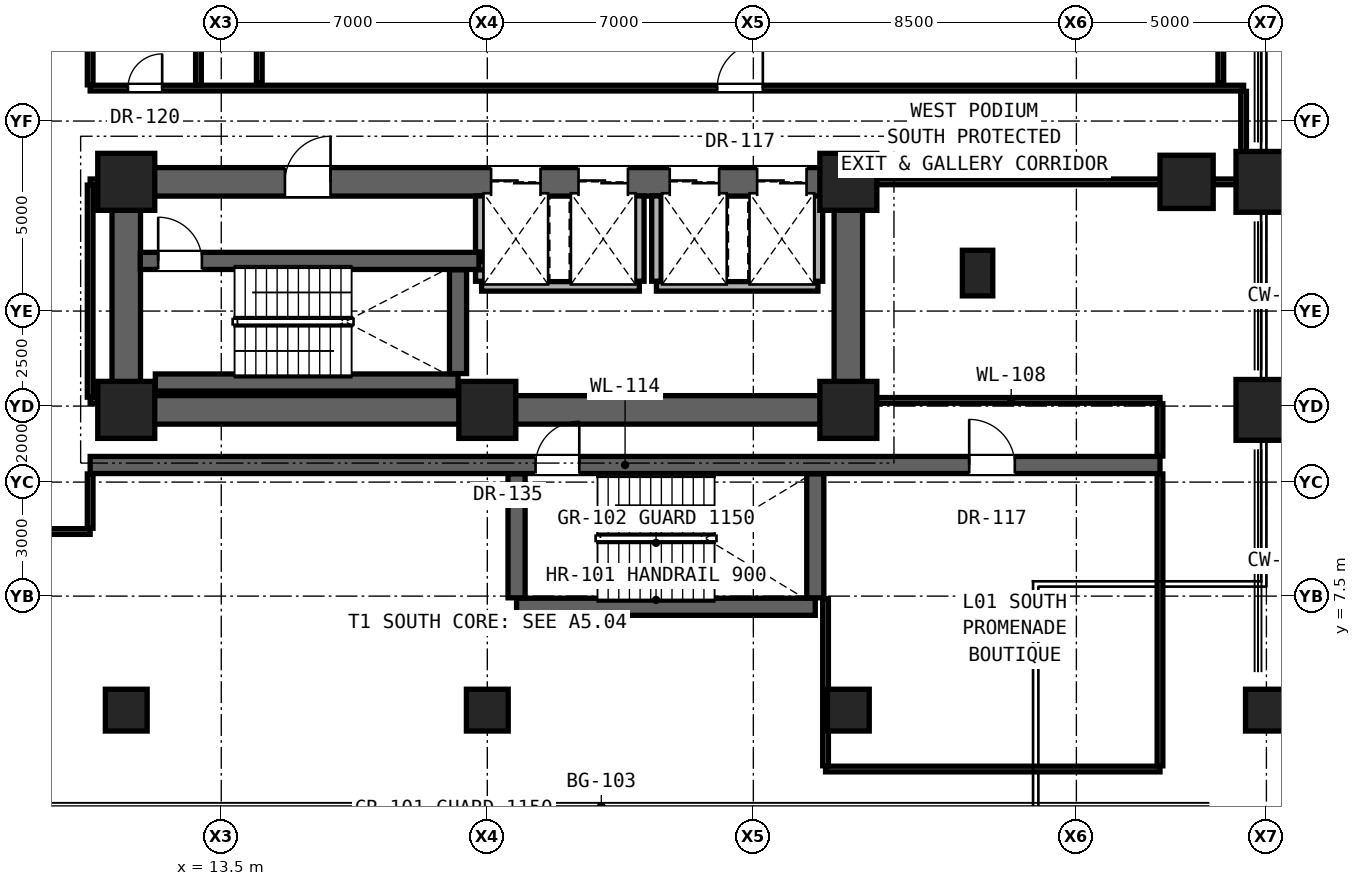
"""IFC4 building model, lengths in metres.
Left out: names, types, materials, properties, quantities, classifications, styles, units other than length and angle.
Written with IfcOpenShell. Run it as: python <this file> out.ifc"""

import sys

from ifc_helpers import new_model, si_unit, direction, frame, frame_2d, origin, origin_2d, place, context, subcontext, project, spatial, rectangle, hollow_rectangle, extrude, element, fill, save


model = new_model("IFC4")
c1 = context("Model", 3, precision=1e-05, world=origin(), true_north=direction((0.0, 1.0)))
c2 = subcontext(c1, "Body", "Model", "MODEL_VIEW")
j1 = project(units=[si_unit("LENGTHUNIT", "METRE"), si_unit("PLANEANGLEUNIT", "RADIAN")], contexts=[c1])
p1 = place(None, origin())
s1 = spatial("IfcSite", under=j1, at=p1, CompositionType="ELEMENT")
p2 = place(p1, origin())
s2 = spatial("IfcBuilding", under=s1, at=p2, CompositionType="ELEMENT")
p3 = place(p2, frame((0.0, 0.0, 5.2)))
s3 = spatial("IfcBuildingStorey", under=s2, at=p3, CompositionType="ELEMENT", Elevation=5.2)
for number, where, z_axis, x_axis in (
    (1, (11.0, 12.4, 0.0), (0.0, 0.0, 1.0), (1.0, 0.0, 0.0)),
    (2, (20.5, 12.4, 0.0), (0.0, 0.0, 1.0), (1.0, 0.0, 0.0)),
    (3, (30.0, 12.4, 0.0), (0.0, 0.0, 1.0), (1.0, 0.0, 0.0)),
    (4, (11.0, 18.4, 0.0), (0.0, 0.0, 1.0), (1.0, 0.0, 0.0)),
    (5, (30.0, 18.4, 0.0), (0.0, 0.0, 1.0), (1.0, 0.0, 0.0)),
):
    element("IfcColumn", number, at=place(p3, frame(where, z_axis=z_axis, x_axis=x_axis)), inside=s3, PredefinedType="COLUMN", context=c2, shape_type="SweptSolid", body=[
        extrude(rectangle(XDim=1.5, YDim=1.5, at=origin_2d()), origin(), (0.0, 0.0, 1.0), 4.3),
    ])
p4 = place(p3, frame((38.9, 18.4, 0.0), z_axis=(0.0, 0.0, 1.0), x_axis=(1.0, 0.0, 0.0)))
e6 = element("IfcColumn", 6, at=p4, inside=s3, PredefinedType="COLUMN", context=c2, shape_type="SweptSolid", body=[
    extrude(hollow_rectangle(XDim=1.4, YDim=1.4, WallThickness=0.08, at=origin_2d()), origin(), (0.0, 0.0, 1.0), 4.3),
])
p5 = place(p3, frame((33.4, 16.0, 0.0), z_axis=(0.0, 0.0, 1.0), x_axis=(1.0, 0.0, 0.0)))
e7 = element("IfcColumn", 7, at=p5, inside=s3, PredefinedType="PILASTER", context=c2, shape_type="SweptSolid", body=[
    extrude(rectangle(XDim=0.8, YDim=1.2, at=origin_2d()), origin(), (0.0, 0.0, 1.0), 4.3),
])
p6 = place(p3, frame((11.0, 12.4, 0.0), z_axis=(0.0, 0.0, 1.0), x_axis=(1.0, 0.0, 0.0)))
e8 = element("IfcWall", 8, at=p6, inside=s3, PredefinedType="SHEAR", context=c2, shape_type="SweptSolid", body=[
    extrude(rectangle(XDim=19.0, YDim=0.75, at=frame_2d((9.5, 0.0))), origin(), (0.0, 0.0, 1.0), 3.98),
])
for number, where, z_axis, x_axis in (
    (9, (11.0, 12.4, 0.0), (0.0, 0.0, 1.0), (0.0, 1.0, 0.0)),
    (10, (30.0, 12.4, 0.0), (0.0, 0.0, 1.0), (0.0, 1.0, 0.0)),
):
    element("IfcWall", number, at=place(p3, frame(where, z_axis=z_axis, x_axis=x_axis)), inside=s3, PredefinedType="SHEAR", context=c2, shape_type="SweptSolid", body=[
        extrude(rectangle(XDim=6.0, YDim=0.75, at=frame_2d((3.0, 0.0))), origin(), (0.0, 0.0, 1.0), 3.98),
    ])
p7 = place(p3, frame((11.0, 18.4, 0.0), z_axis=(0.0, 0.0, 1.0), x_axis=(1.0, 0.0, 0.0)))
e11 = element("IfcWall", 11, at=p7, inside=s3, PredefinedType="SHEAR", context=c2, shape_type="SweptSolid", body=[
    extrude(rectangle(XDim=19.0, YDim=0.75, at=frame_2d((9.5, 0.0))), origin(), (0.0, 0.0, 1.0), 3.98),
])
p8 = place(p7, frame((4.175, 0.0, 0.0)))
e12 = element("IfcOpeningElement", 12, at=p8, cuts=e11, PredefinedType="OPENING", context=c2, shape_type="SweptSolid", body=[
    extrude(rectangle(XDim=1.2, YDim=2.25, at=frame_2d((0.6, 1.125))), frame((0.0, 0.385, 0.0), z_axis=(0.0, -1.0, 0.0), x_axis=(1.0, 0.0, 0.0)), (0.0, 0.0, 1.0), 0.77),
])
p9 = place(p7, frame((9.6, 0.0, 0.0)))
e13 = element("IfcOpeningElement", 13, at=p9, cuts=e11, PredefinedType="OPENING", context=c2, shape_type="SweptSolid", body=[
    extrude(rectangle(XDim=1.3, YDim=2.3, at=frame_2d((0.65, 1.15))), frame((0.0, 0.385, 0.0), z_axis=(0.0, -1.0, 0.0), x_axis=(1.0, 0.0, 0.0)), (0.0, 0.0, 1.0), 0.77),
])
p10 = place(p7, frame((11.9, 0.0, 0.0)))
e14 = element("IfcOpeningElement", 14, at=p10, cuts=e11, PredefinedType="OPENING", context=c2, shape_type="SweptSolid", body=[
    extrude(rectangle(XDim=1.3, YDim=2.3, at=frame_2d((0.65, 1.15))), frame((0.0, 0.385, 0.0), z_axis=(0.0, -1.0, 0.0), x_axis=(1.0, 0.0, 0.0)), (0.0, 0.0, 1.0), 0.77),
])
p11 = place(p7, frame((14.3, 0.0, 0.0)))
e15 = element("IfcOpeningElement", 15, at=p11, cuts=e11, PredefinedType="OPENING", context=c2, shape_type="SweptSolid", body=[
    extrude(rectangle(XDim=1.3, YDim=2.3, at=frame_2d((0.65, 1.15))), frame((0.0, 0.385, 0.0), z_axis=(0.0, -1.0, 0.0), x_axis=(1.0, 0.0, 0.0)), (0.0, 0.0, 1.0), 0.77),
])
p12 = place(p7, frame((16.6, 0.0, 0.0)))
e16 = element("IfcOpeningElement", 16, at=p12, cuts=e11, PredefinedType="OPENING", context=c2, shape_type="SweptSolid", body=[
    extrude(rectangle(XDim=1.3, YDim=2.3, at=frame_2d((0.65, 1.15))), frame((0.0, 0.385, 0.0), z_axis=(0.0, -1.0, 0.0), x_axis=(1.0, 0.0, 0.0)), (0.0, 0.0, 1.0), 0.77),
])
for number, where, z_axis, x_axis in (
    (17, (41.0, 12.4, 0.0), (0.0, 0.0, 1.0), (1.0, 0.0, 0.0)),
    (18, (41.0, 18.4, 0.0), (0.0, 0.0, 1.0), (1.0, 0.0, 0.0)),
):
    element("IfcColumn", number, at=place(p3, frame(where, z_axis=z_axis, x_axis=x_axis)), inside=s3, PredefinedType="COLUMN", context=c2, shape_type="SweptSolid", body=[
        extrude(rectangle(XDim=1.6, YDim=1.6, at=origin_2d()), origin(), (0.0, 0.0, 1.0), 4.3),
    ])
for number, where, z_axis, x_axis in (
    (19, (11.0, 4.5, 0.0), (0.0, 0.0, 1.0), (1.0, 0.0, 0.0)),
    (20, (20.5, 4.5, 0.0), (0.0, 0.0, 1.0), (1.0, 0.0, 0.0)),
    (21, (30.0, 4.5, 0.0), (0.0, 0.0, 1.0), (1.0, 0.0, 0.0)),
    (22, (41.0, 4.5, 0.0), (0.0, 0.0, 1.0), (1.0, 0.0, 0.0)),
):
    element("IfcColumn", number, at=place(p3, frame(where, z_axis=z_axis, x_axis=x_axis)), inside=s3, PredefinedType="COLUMN", context=c2, shape_type="SweptSolid", body=[
        extrude(rectangle(XDim=1.1, YDim=1.1, at=origin_2d()), origin(), (0.0, 0.0, 1.0), 4.3),
    ])
p13 = place(p3, frame((29.4, 2.95, 0.0), z_axis=(0.0, 0.0, 1.0), x_axis=(1.0, 0.0, 0.0)))
e23 = element("IfcWall", 23, at=p13, inside=s3, PredefinedType="PARTITIONING", context=c2, shape_type="SweptSolid", body=[
    extrude(rectangle(XDim=8.8, YDim=0.15, at=frame_2d((4.4, 0.0))), origin(), (0.0, 0.0, 1.0), 3.98),
])
p14 = place(p3, frame((21.27, 7.22, 0.0), z_axis=(0.0, 0.0, 1.0), x_axis=(1.0, 0.0, 0.0)))
e24 = element("IfcWall", 24, at=p14, inside=s3, PredefinedType="SHEAR", context=c2, shape_type="SweptSolid", body=[
    extrude(rectangle(XDim=7.86, YDim=0.45, at=frame_2d((3.93, 0.0))), origin(), (0.0, 0.0, 1.0), 3.98),
])
p15 = place(p3, frame((7.8, 9.2, 0.0), z_axis=(0.0, 0.0, 1.0), x_axis=(1.0, 0.0, 0.0)))
e25 = element("IfcWall", 25, at=p15, inside=s3, PredefinedType="PARTITIONING", context=c2, shape_type="SweptSolid", body=[
    extrude(rectangle(XDim=2.25, YDim=0.15, at=frame_2d((1.125, 0.0))), origin(), (0.0, 0.0, 1.0), 3.98),
])
p16 = place(p3, frame((10.05, 10.95, 0.0), z_axis=(0.0, 0.0, 1.0), x_axis=(1.0, 0.0, 0.0)))
e26 = element("IfcWall", 26, at=p16, inside=s3, PredefinedType="SHEAR", context=c2, shape_type="SweptSolid", body=[
    extrude(rectangle(XDim=28.15, YDim=0.45, at=frame_2d((14.075, 0.0))), origin(), (0.0, 0.0, 1.0), 3.98),
])
p17 = place(p16, frame((11.72, 0.0, 0.0)))
e27 = element("IfcOpeningElement", 27, at=p17, cuts=e26, PredefinedType="OPENING", context=c2, shape_type="SweptSolid", body=[
    extrude(rectangle(XDim=1.15, YDim=2.2, at=frame_2d((0.575, 1.1))), frame((0.0, 0.235, 0.0), z_axis=(0.0, -1.0, 0.0), x_axis=(1.0, 0.0, 0.0)), (0.0, 0.0, 1.0), 0.47),
])
p18 = place(p16, frame((23.13, 0.0, 0.0)))
e28 = element("IfcOpeningElement", 28, at=p18, cuts=e26, PredefinedType="OPENING", context=c2, shape_type="SweptSolid", body=[
    extrude(rectangle(XDim=1.2, YDim=2.25, at=frame_2d((0.6, 1.125))), frame((0.0, 0.235, 0.0), z_axis=(0.0, -1.0, 0.0), x_axis=(1.0, 0.0, 0.0)), (0.0, 0.0, 1.0), 0.47),
])
p19 = place(p3, frame((10.05, 12.65, 0.0), z_axis=(0.0, 0.0, 1.0), x_axis=(1.0, 0.0, 0.0)))
e29 = element("IfcWall", 29, at=p19, inside=s3, PredefinedType="PARTITIONING", context=c2, shape_type="SweptSolid", body=[
    extrude(rectangle(XDim=0.58, YDim=0.15, at=frame_2d((0.29, 0.0))), origin(), (0.0, 0.0, 1.0), 3.98),
])
p20 = place(p3, frame((30.37, 12.65, 0.0), z_axis=(0.0, 0.0, 1.0), x_axis=(1.0, 0.0, 0.0)))
e30 = element("IfcWall", 30, at=p20, inside=s3, PredefinedType="PARTITIONING", context=c2, shape_type="SweptSolid", body=[
    extrude(rectangle(XDim=7.83, YDim=0.15, at=frame_2d((3.915, 0.0))), origin(), (0.0, 0.0, 1.0), 3.024),
])
p21 = place(p3, frame((11.765, 13.12, 0.0), z_axis=(0.0, 0.0, 1.0), x_axis=(1.0, 0.0, 0.0)))
e31 = element("IfcWall", 31, at=p21, inside=s3, PredefinedType="SHEAR", context=c2, shape_type="SweptSolid", body=[
    extrude(rectangle(XDim=7.965, YDim=0.45, at=frame_2d((3.982, 0.0))), origin(), (0.0, 0.0, 1.0), 3.98),
])
p22 = place(p3, frame((20.35, 15.65, 0.0), z_axis=(0.0, 0.0, 1.0), x_axis=(1.0, 0.0, 0.0)))
e32 = element("IfcWall", 32, at=p22, inside=s3, PredefinedType="SOLIDWALL", context=c2, shape_type="SweptSolid", body=[
    extrude(rectangle(XDim=4.15, YDim=0.25, at=frame_2d((2.075, 0.0))), origin(), (0.0, 0.0, 1.0), 3.98),
])
p23 = place(p3, frame((24.95, 15.65, 0.0), z_axis=(0.0, 0.0, 1.0), x_axis=(1.0, 0.0, 0.0)))
e33 = element("IfcWall", 33, at=p23, inside=s3, PredefinedType="SOLIDWALL", context=c2, shape_type="SweptSolid", body=[
    extrude(rectangle(XDim=4.25, YDim=0.25, at=frame_2d((2.125, 0.0))), origin(), (0.0, 0.0, 1.0), 3.98),
])
p24 = place(p3, frame((11.37, 16.32, 0.0), z_axis=(0.0, 0.0, 1.0), x_axis=(1.0, 0.0, 0.0)))
e34 = element("IfcWall", 34, at=p24, inside=s3, PredefinedType="SHEAR", context=c2, shape_type="SweptSolid", body=[
    extrude(rectangle(XDim=8.91, YDim=0.45, at=frame_2d((4.455, 0.0))), origin(), (0.0, 0.0, 1.0), 3.98),
])
p25 = place(p24, frame((0.47, 0.0, 0.0)))
e35 = element("IfcOpeningElement", 35, at=p25, cuts=e34, PredefinedType="OPENING", context=c2, shape_type="SweptSolid", body=[
    extrude(rectangle(XDim=1.15, YDim=2.2, at=frame_2d((0.575, 1.1))), frame((0.0, 0.235, 0.0), z_axis=(0.0, -1.0, 0.0), x_axis=(1.0, 0.0, 0.0)), (0.0, 0.0, 1.0), 0.47),
])
p26 = place(p3, frame((10.05, 18.4, 0.0), z_axis=(0.0, 0.0, 1.0), x_axis=(1.0, 0.0, 0.0)))
e36 = element("IfcWall", 36, at=p26, inside=s3, PredefinedType="PARTITIONING", context=c2, shape_type="SweptSolid", body=[
    extrude(rectangle(XDim=0.58, YDim=0.15, at=frame_2d((0.29, 0.0))), origin(), (0.0, 0.0, 1.0), 2.872),
])
p27 = place(p3, frame((30.37, 18.4, 0.0), z_axis=(0.0, 0.0, 1.0), x_axis=(1.0, 0.0, 0.0)))
e37 = element("IfcWall", 37, at=p27, inside=s3, PredefinedType="PARTITIONING", context=c2, shape_type="SweptSolid", body=[
    extrude(rectangle(XDim=10.03, YDim=0.15, at=frame_2d((5.015, 0.0))), origin(), (0.0, 0.0, 1.0), 2.872),
])
p28 = place(p3, frame((10.05, 20.867, 0.0), z_axis=(0.0, 0.0, 1.0), x_axis=(1.0, 0.0, 0.0)))
e38 = element("IfcWall", 38, at=p28, inside=s3, PredefinedType="PARTITIONING", context=c2, shape_type="SweptSolid", body=[
    extrude(rectangle(XDim=30.35, YDim=0.15, at=frame_2d((15.175, 0.0))), origin(), (0.0, 0.0, 1.0), 2.932),
])
p29 = place(p28, frame((0.995, 0.0, 0.0)))
e39 = element("IfcOpeningElement", 39, at=p29, cuts=e38, PredefinedType="OPENING", context=c2, shape_type="SweptSolid", body=[
    extrude(rectangle(XDim=0.9, YDim=2.1, at=frame_2d((0.45, 1.05))), frame((0.0, 0.085, 0.0), z_axis=(0.0, -1.0, 0.0), x_axis=(1.0, 0.0, 0.0)), (0.0, 0.0, 1.0), 0.17),
])
p30 = place(p28, frame((16.5, 0.0, 0.0)))
e40 = element("IfcOpeningElement", 40, at=p30, cuts=e38, PredefinedType="OPENING", context=c2, shape_type="SweptSolid", body=[
    extrude(rectangle(XDim=1.2, YDim=2.25, at=frame_2d((0.6, 1.125))), frame((0.0, 0.085, 0.0), z_axis=(0.0, -1.0, 0.0), x_axis=(1.0, 0.0, 0.0)), (0.0, 0.0, 1.0), 0.17),
])
p31 = place(p3, frame((10.05, 9.285, 0.0), z_axis=(0.0, 0.0, 1.0), x_axis=(0.0, 1.0, 0.0)))
e41 = element("IfcWall", 41, at=p31, inside=s3, PredefinedType="PARTITIONING", context=c2, shape_type="SweptSolid", body=[
    extrude(rectangle(XDim=1.43, YDim=0.15, at=frame_2d((0.715, 0.0))), origin(), (0.0, 0.0, 1.0), 3.98),
])
p32 = place(p3, frame((10.05, 12.735, 0.0), z_axis=(0.0, 0.0, 1.0), x_axis=(0.0, 1.0, 0.0)))
e42 = element("IfcWall", 42, at=p32, inside=s3, PredefinedType="PARTITIONING", context=c2, shape_type="SweptSolid", body=[
    extrude(rectangle(XDim=5.58, YDim=0.15, at=frame_2d((2.79, 0.0))), origin(), (0.0, 0.0, 1.0), 2.872),
])
for number, where, z_axis, x_axis in (
    (43, (10.05, 20.952, 0.0), (0.0, 0.0, 1.0), (0.0, 1.0, 0.0)),
    (44, (12.9, 20.952, 0.0), (0.0, 0.0, 1.0), (0.0, 1.0, 0.0)),
):
    element("IfcWall", number, at=place(p3, frame(where, z_axis=z_axis, x_axis=x_axis)), inside=s3, PredefinedType="PARTITIONING", context=c2, shape_type="SweptSolid", body=[
        extrude(rectangle(XDim=2.563, YDim=0.15, at=frame_2d((1.282, 0.0))), origin(), (0.0, 0.0, 1.0), 3.98),
    ])
p33 = place(p3, frame((14.5, 21.0, 0.0), z_axis=(0.0, 0.0, 1.0), x_axis=(0.0, 1.0, 0.0)))
e45 = element("IfcWall", 45, at=p33, inside=s3, PredefinedType="PARTITIONING", context=c2, shape_type="SweptSolid", body=[
    extrude(rectangle(XDim=10.315, YDim=0.15, at=frame_2d((5.157, 0.0))), origin(), (0.0, 0.0, 1.0), 2.932),
])
p34 = place(p3, frame((19.73, 13.355, 0.0), z_axis=(0.0, 0.0, 1.0), x_axis=(0.0, 1.0, 0.0)))
e46 = element("IfcWall", 46, at=p34, inside=s3, PredefinedType="SHEAR", context=c2, shape_type="SweptSolid", body=[
    extrude(rectangle(XDim=2.73, YDim=0.45, at=frame_2d((1.365, 0.0))), origin(), (0.0, 0.0, 1.0), 3.98),
])
p35 = place(p3, frame((20.315, 15.785, 0.0), z_axis=(0.0, 0.0, 1.0), x_axis=(0.0, 1.0, 0.0)))
e47 = element("IfcWall", 47, at=p35, inside=s3, PredefinedType="SOLIDWALL", context=c2, shape_type="SweptSolid", body=[
    extrude(rectangle(XDim=0.3, YDim=0.25, at=frame_2d((0.15, 0.0))), origin(), (0.0, 0.0, 1.0), 3.98),
])
p36 = place(p3, frame((20.315, 16.555, 0.0), z_axis=(0.0, 0.0, 1.0), x_axis=(0.0, 1.0, 0.0)))
e48 = element("IfcWall", 48, at=p36, inside=s3, PredefinedType="SOLIDWALL", context=c2, shape_type="SweptSolid", body=[
    extrude(rectangle(XDim=1.475, YDim=0.25, at=frame_2d((0.738, 0.0))), origin(), (0.0, 0.0, 1.0), 3.98),
])
p37 = place(p3, frame((21.27, 7.455, 0.0), z_axis=(0.0, 0.0, 1.0), x_axis=(0.0, 1.0, 0.0)))
e49 = element("IfcWall", 49, at=p37, inside=s3, PredefinedType="SHEAR", context=c2, shape_type="SweptSolid", body=[
    extrude(rectangle(XDim=3.26, YDim=0.45, at=frame_2d((1.63, 0.0))), origin(), (0.0, 0.0, 1.0), 3.98),
])
for number, where, z_axis, x_axis in (
    (50, (24.5, 15.785, 0.0), (0.0, 0.0, 1.0), (0.0, 1.0, 0.0)),
    (51, (24.95, 15.785, 0.0), (0.0, 0.0, 1.0), (0.0, 1.0, 0.0)),
):
    element("IfcWall", number, at=place(p3, frame(where, z_axis=z_axis, x_axis=x_axis)), inside=s3, PredefinedType="SOLIDWALL", context=c2, shape_type="SweptSolid", body=[
        extrude(rectangle(XDim=2.245, YDim=0.25, at=frame_2d((1.123, 0.0))), origin(), (0.0, 0.0, 1.0), 3.98),
    ])
p38 = place(p3, frame((29.13, 7.455, 0.0), z_axis=(0.0, 0.0, 1.0), x_axis=(0.0, 1.0, 0.0)))
e52 = element("IfcWall", 52, at=p38, inside=s3, PredefinedType="SHEAR", context=c2, shape_type="SweptSolid", body=[
    extrude(rectangle(XDim=3.26, YDim=0.45, at=frame_2d((1.63, 0.0))), origin(), (0.0, 0.0, 1.0), 3.98),
])
p39 = place(p3, frame((29.2, 15.785, 0.0), z_axis=(0.0, 0.0, 1.0), x_axis=(0.0, 1.0, 0.0)))
e53 = element("IfcWall", 53, at=p39, inside=s3, PredefinedType="SOLIDWALL", context=c2, shape_type="SweptSolid", body=[
    extrude(rectangle(XDim=2.245, YDim=0.25, at=frame_2d((1.123, 0.0))), origin(), (0.0, 0.0, 1.0), 3.98),
])
p40 = place(p3, frame((29.4, 3.035, 0.0), z_axis=(0.0, 0.0, 1.0), x_axis=(0.0, 1.0, 0.0)))
e54 = element("IfcWall", 54, at=p40, inside=s3, PredefinedType="PARTITIONING", context=c2, shape_type="SweptSolid", body=[
    extrude(rectangle(XDim=4.4, YDim=0.15, at=frame_2d((2.2, 0.0))), origin(), (0.0, 0.0, 1.0), 3.199),
])
p41 = place(p3, frame((38.2, 3.035, 0.0), z_axis=(0.0, 0.0, 1.0), x_axis=(0.0, 1.0, 0.0)))
e55 = element("IfcWall", 55, at=p41, inside=s3, PredefinedType="PARTITIONING", context=c2, shape_type="SweptSolid", body=[
    extrude(rectangle(XDim=7.68, YDim=0.15, at=frame_2d((3.84, 0.0))), origin(), (0.0, 0.0, 1.0), 3.199),
])
p42 = place(p3, frame((38.2, 11.185, 0.0), z_axis=(0.0, 0.0, 1.0), x_axis=(0.0, 1.0, 0.0)))
e56 = element("IfcWall", 56, at=p42, inside=s3, PredefinedType="PARTITIONING", context=c2, shape_type="SweptSolid", body=[
    extrude(rectangle(XDim=1.38, YDim=0.15, at=frame_2d((0.69, 0.0))), origin(), (0.0, 0.0, 1.0), 3.024),
])
p43 = place(p3, frame((39.8, 21.0, 0.0), z_axis=(0.0, 0.0, 1.0), x_axis=(0.0, 1.0, 0.0)))
e57 = element("IfcWall", 57, at=p43, inside=s3, PredefinedType="PARTITIONING", context=c2, shape_type="SweptSolid", body=[
    extrude(rectangle(XDim=10.315, YDim=0.15, at=frame_2d((5.157, 0.0))), origin(), (0.0, 0.0, 1.0), 3.98),
])
p44 = place(p3, frame((40.4, 18.485, 0.0), z_axis=(0.0, 0.0, 1.0), x_axis=(0.0, 1.0, 0.0)))
e58 = element("IfcWall", 58, at=p44, inside=s3, PredefinedType="PARTITIONING", context=c2, shape_type="SweptSolid", body=[
    extrude(rectangle(XDim=2.297, YDim=0.15, at=frame_2d((1.148, 0.0))), origin(), (0.0, 0.0, 1.0), 3.024),
])
p45 = place(p8, origin())
e59 = element("IfcDoor", 59, at=p45, inside=s3, OperationType="SINGLE_SWING_RIGHT", PredefinedType="DOOR", context=c2, shape_type="SweptSolid", body=[
    extrude(rectangle(XDim=1.2, YDim=2.25, at=frame_2d((0.6, 1.125))), frame((0.0, 0.025, 0.0), z_axis=(0.0, -1.0, 0.0), x_axis=(1.0, 0.0, 0.0)), (0.0, 0.0, 1.0), 0.05),
])
fill(e12, e59)
p46 = place(p25, origin())
e60 = element("IfcDoor", 60, at=p46, inside=s3, OperationType="SINGLE_SWING_LEFT", PredefinedType="DOOR", context=c2, shape_type="SweptSolid", body=[
    extrude(rectangle(XDim=1.15, YDim=2.2, at=frame_2d((0.575, 1.1))), frame((0.0, 0.025, 0.0), z_axis=(0.0, -1.0, 0.0), x_axis=(1.0, 0.0, 0.0)), (0.0, 0.0, 1.0), 0.05),
])
fill(e35, e60)
p47 = place(p29, origin())
e61 = element("IfcDoor", 61, at=p47, inside=s3, OperationType="SINGLE_SWING_RIGHT", PredefinedType="DOOR", context=c2, shape_type="SweptSolid", body=[
    extrude(rectangle(XDim=0.9, YDim=2.1, at=frame_2d((0.45, 1.05))), frame((0.0, 0.025, 0.0), z_axis=(0.0, -1.0, 0.0), x_axis=(1.0, 0.0, 0.0)), (0.0, 0.0, 1.0), 0.05),
])
fill(e39, e61)
p48 = place(p17, origin())
e62 = element("IfcDoor", 62, at=p48, inside=s3, OperationType="SINGLE_SWING_RIGHT", PredefinedType="DOOR", context=c2, shape_type="SweptSolid", body=[
    extrude(rectangle(XDim=1.15, YDim=2.2, at=frame_2d((0.575, 1.1))), frame((0.0, 0.025, 0.0), z_axis=(0.0, -1.0, 0.0), x_axis=(1.0, 0.0, 0.0)), (0.0, 0.0, 1.0), 0.05),
])
fill(e27, e62)
p49 = place(p30, origin())
e63 = element("IfcDoor", 63, at=p49, inside=s3, OperationType="SINGLE_SWING_RIGHT", PredefinedType="DOOR", context=c2, shape_type="SweptSolid", body=[
    extrude(rectangle(XDim=1.2, YDim=2.25, at=frame_2d((0.6, 1.125))), frame((0.0, 0.025, 0.0), z_axis=(0.0, -1.0, 0.0), x_axis=(1.0, 0.0, 0.0)), (0.0, 0.0, 1.0), 0.05),
])
fill(e40, e63)
p50 = place(p18, origin())
e64 = element("IfcDoor", 64, at=p50, inside=s3, OperationType="SINGLE_SWING_LEFT", PredefinedType="DOOR", context=c2, shape_type="SweptSolid", body=[
    extrude(rectangle(XDim=1.2, YDim=2.25, at=frame_2d((0.6, 1.125))), frame((0.0, 0.025, 0.0), z_axis=(0.0, -1.0, 0.0), x_axis=(1.0, 0.0, 0.0)), (0.0, 0.0, 1.0), 0.05),
])
fill(e28, e64)
p51 = place(p9, origin())
e65 = element("IfcDoor", 65, at=p51, inside=s3, OperationType="DOUBLE_DOOR_SLIDING", PredefinedType="DOOR", context=c2, shape_type="SweptSolid", body=[
    extrude(rectangle(XDim=1.3, YDim=2.3, at=frame_2d((0.65, 1.15))), frame((0.0, 0.025, 0.0), z_axis=(0.0, -1.0, 0.0), x_axis=(1.0, 0.0, 0.0)), (0.0, 0.0, 1.0), 0.05),
])
fill(e13, e65)
p52 = place(p10, origin())
e66 = element("IfcDoor", 66, at=p52, inside=s3, OperationType="DOUBLE_DOOR_SLIDING", PredefinedType="DOOR", context=c2, shape_type="SweptSolid", body=[
    extrude(rectangle(XDim=1.3, YDim=2.3, at=frame_2d((0.65, 1.15))), frame((0.0, 0.025, 0.0), z_axis=(0.0, -1.0, 0.0), x_axis=(1.0, 0.0, 0.0)), (0.0, 0.0, 1.0), 0.05),
])
fill(e14, e66)
p53 = place(p11, origin())
e67 = element("IfcDoor", 67, at=p53, inside=s3, OperationType="DOUBLE_DOOR_SLIDING", PredefinedType="DOOR", context=c2, shape_type="SweptSolid", body=[
    extrude(rectangle(XDim=1.3, YDim=2.3, at=frame_2d((0.65, 1.15))), frame((0.0, 0.025, 0.0), z_axis=(0.0, -1.0, 0.0), x_axis=(1.0, 0.0, 0.0)), (0.0, 0.0, 1.0), 0.05),
])
fill(e15, e67)
p54 = place(p12, origin())
e68 = element("IfcDoor", 68, at=p54, inside=s3, OperationType="DOUBLE_DOOR_SLIDING", PredefinedType="DOOR", context=c2, shape_type="SweptSolid", body=[
    extrude(rectangle(XDim=1.3, YDim=2.3, at=frame_2d((0.65, 1.15))), frame((0.0, 0.025, 0.0), z_axis=(0.0, -1.0, 0.0), x_axis=(1.0, 0.0, 0.0)), (0.0, 0.0, 1.0), 0.05),
])
fill(e16, e68)
save(model, sys.argv[1])
